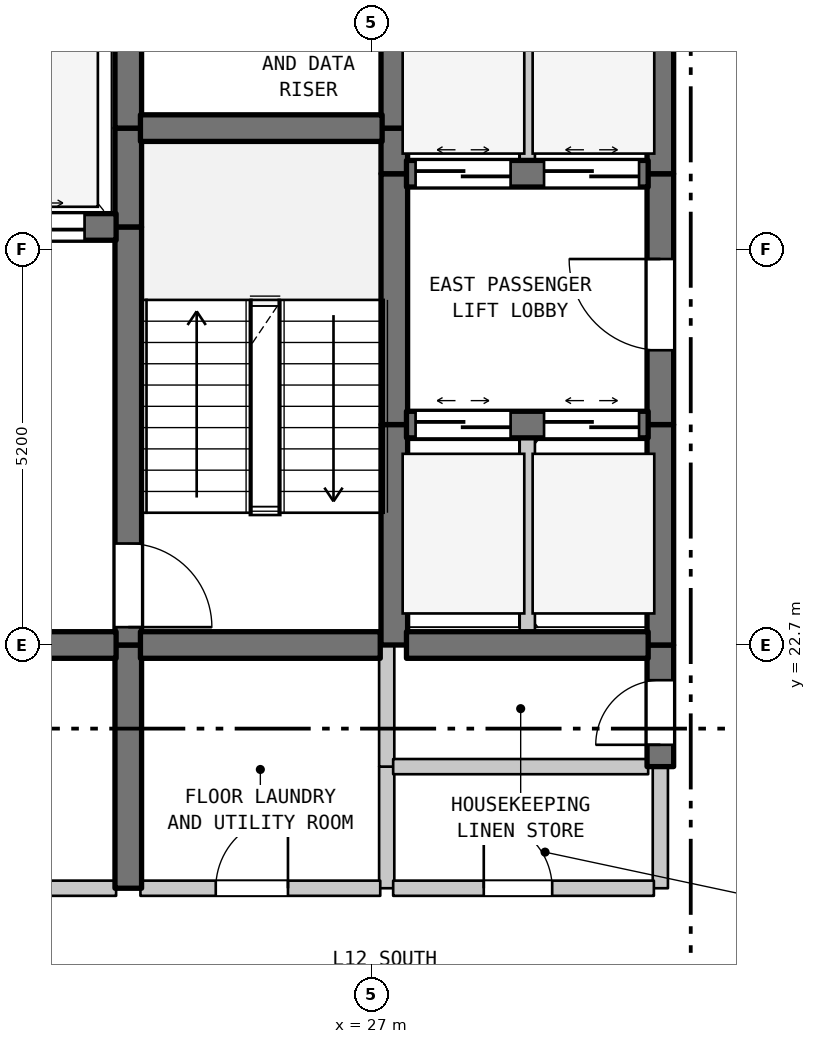
"""IFC4 building model, lengths in metres.
Left out: names, types, materials, properties, quantities, classifications, styles, units other than length and angle.
Written with IfcOpenShell. Run it as: python <this file> out.ifc"""

import sys

from ifc_helpers import new_model, si_unit, direction, frame, frame_2d, origin, place, context, subcontext, project, spatial, rectangle, extrude, element, fill, save


model = new_model("IFC4")
c1 = context("Model", 3, precision=1e-05, world=origin(), true_north=direction((0.0, 1.0)))
c2 = subcontext(c1, "Body", "Model", "MODEL_VIEW")
j1 = project(units=[si_unit("LENGTHUNIT", "METRE"), si_unit("PLANEANGLEUNIT", "RADIAN")], contexts=[c1])
p1 = place(None, origin())
s1 = spatial("IfcSite", under=j1, at=p1, CompositionType="ELEMENT")
p2 = place(p1, origin())
s2 = spatial("IfcBuilding", under=s1, at=p2, CompositionType="ELEMENT")
p3 = place(p2, frame((0.0, 0.0, 53.6)))
s3 = spatial("IfcBuildingStorey", under=s2, at=p3, CompositionType="ELEMENT", Elevation=53.6)
p4 = place(p3, frame((23.8, 19.5, 0.0), z_axis=(0.0, 0.0, 1.0), x_axis=(0.0, 1.0, 0.0)))
e1 = element("IfcWall", 1, at=p4, inside=s3, PredefinedType="SHEAR", context=c2, shape_type="SweptSolid", body=[
    extrude(rectangle(XDim=3.2, YDim=0.35, at=frame_2d((1.6, 0.0))), origin(), (0.0, 0.0, 1.0), 3.385),
])
p5 = place(p3, frame((23.8, 22.7, 0.0), z_axis=(0.0, 0.0, 1.0), x_axis=(0.0, 1.0, 0.0)))
e2 = element("IfcWall", 2, at=p5, inside=s3, PredefinedType="SHEAR", context=c2, shape_type="SweptSolid", body=[
    extrude(rectangle(XDim=5.5, YDim=0.35, at=frame_2d((2.75, 0.0))), origin(), (0.0, 0.0, 1.0), 3.385),
])
p6 = place(p5, frame((0.235, 0.0, 0.0)))
e3 = element("IfcOpeningElement", 3, at=p6, cuts=e2, PredefinedType="OPENING", context=c2, shape_type="SweptSolid", body=[
    extrude(rectangle(XDim=1.1, YDim=2.15, at=frame_2d((0.55, 1.075))), frame((0.0, 0.185, 0.0), z_axis=(0.0, -1.0, 0.0), x_axis=(1.0, 0.0, 0.0)), (0.0, 0.0, 1.0), 0.37),
])
for number, where, z_axis, x_axis in (
    (4, (23.8, 28.2, 0.0), (0.0, 0.0, 1.0), (0.0, 1.0, 0.0)),
    (5, (23.8, 29.5, 0.0), (0.0, 0.0, 1.0), (0.0, 1.0, 0.0)),
):
    element("IfcWall", number, at=place(p3, frame(where, z_axis=z_axis, x_axis=x_axis)), inside=s3, PredefinedType="SHEAR", context=c2, shape_type="SweptSolid", body=[
        extrude(rectangle(XDim=1.3, YDim=0.35, at=frame_2d((0.65, 0.0))), origin(), (0.0, 0.0, 1.0), 3.385),
    ])
p7 = place(p3, frame((27.2, 19.5, 0.0), z_axis=(0.0, 0.0, 1.0), x_axis=(0.0, 1.0, 0.0)))
e6 = element("IfcWall", 6, at=p7, inside=s3, PredefinedType="STANDARD", context=c2, shape_type="SweptSolid", body=[
    extrude(rectangle(XDim=1.6, YDim=0.2, at=frame_2d((0.8, 0.0))), origin(), (0.0, 0.0, 1.0), 3.385),
])
p8 = place(p3, frame((27.2, 21.1, 0.0), z_axis=(0.0, 0.0, 1.0), x_axis=(0.0, 1.0, 0.0)))
e7 = element("IfcWall", 7, at=p8, inside=s3, PredefinedType="STANDARD", context=c2, shape_type="SweptSolid", body=[
    extrude(rectangle(XDim=1.6, YDim=0.2, at=frame_2d((0.8, 0.0))), origin(), (0.0, 0.0, 1.0), 3.385),
])
p9 = place(p3, frame((27.3, 22.7, 0.0), z_axis=(0.0, 0.0, 1.0), x_axis=(0.0, 1.0, 0.0)))
e8 = element("IfcWall", 8, at=p9, inside=s3, PredefinedType="SHEAR", context=c2, shape_type="SweptSolid", body=[
    extrude(rectangle(XDim=2.9, YDim=0.35, at=frame_2d((1.45, 0.0))), origin(), (0.0, 0.0, 1.0), 3.385),
])
p10 = place(p3, frame((27.3, 25.6, 0.0), z_axis=(0.0, 0.0, 1.0), x_axis=(0.0, 1.0, 0.0)))
e9 = element("IfcWall", 9, at=p10, inside=s3, PredefinedType="SHEAR", context=c2, shape_type="SweptSolid", body=[
    extrude(rectangle(XDim=3.3, YDim=0.35, at=frame_2d((1.65, 0.0))), origin(), (0.0, 0.0, 1.0), 3.385),
])
p11 = place(p3, frame((27.3, 28.9, 0.0), z_axis=(0.0, 0.0, 1.0), x_axis=(0.0, 1.0, 0.0)))
e10 = element("IfcWall", 10, at=p11, inside=s3, PredefinedType="SHEAR", context=c2, shape_type="SweptSolid", body=[
    extrude(rectangle(XDim=0.6, YDim=0.35, at=frame_2d((0.3, 0.0))), origin(), (0.0, 0.0, 1.0), 3.385),
])
p12 = place(p3, frame((27.3, 29.5, 0.0), z_axis=(0.0, 0.0, 1.0), x_axis=(0.0, 1.0, 0.0)))
e11 = element("IfcWall", 11, at=p12, inside=s3, PredefinedType="SHEAR", context=c2, shape_type="SweptSolid", body=[
    extrude(rectangle(XDim=2.0, YDim=0.35, at=frame_2d((1.0, 0.0))), origin(), (0.0, 0.0, 1.0), 3.385),
])
p13 = place(p3, frame((29.05, 22.7, 0.0), z_axis=(0.0, 0.0, 1.0), x_axis=(0.0, 1.0, 0.0)))
e12 = element("IfcWall", 12, at=p13, inside=s3, PredefinedType="STANDARD", context=c2, shape_type="SweptSolid", body=[
    extrude(rectangle(XDim=2.9, YDim=0.2, at=frame_2d((1.45, 0.0))), origin(), (0.0, 0.0, 1.0), 3.385),
])
p14 = place(p3, frame((29.05, 28.9, 0.0), z_axis=(0.0, 0.0, 1.0), x_axis=(0.0, 1.0, 0.0)))
e13 = element("IfcWall", 13, at=p14, inside=s3, PredefinedType="STANDARD", context=c2, shape_type="SweptSolid", body=[
    extrude(rectangle(XDim=2.6, YDim=0.2, at=frame_2d((1.3, 0.0))), origin(), (0.0, 0.0, 1.0), 3.385),
])
p15 = place(p3, frame((30.8, 19.5, 0.0), z_axis=(0.0, 0.0, 1.0), x_axis=(0.0, 1.0, 0.0)))
e14 = element("IfcWall", 14, at=p15, inside=s3, PredefinedType="STANDARD", context=c2, shape_type="SweptSolid", body=[
    extrude(rectangle(XDim=1.6, YDim=0.2, at=frame_2d((0.8, 0.0))), origin(), (0.0, 0.0, 1.0), 3.385),
])
p16 = place(p3, frame((30.8, 21.1, 0.0), z_axis=(0.0, 0.0, 1.0), x_axis=(0.0, 1.0, 0.0)))
e15 = element("IfcWall", 15, at=p16, inside=s3, PredefinedType="SHEAR", context=c2, shape_type="SweptSolid", body=[
    extrude(rectangle(XDim=1.6, YDim=0.35, at=frame_2d((0.8, 0.0))), origin(), (0.0, 0.0, 1.0), 3.385),
])
p17 = place(p16, frame((0.287, 0.0, 0.0)))
e16 = element("IfcOpeningElement", 16, at=p17, cuts=e15, PredefinedType="OPENING", context=c2, shape_type="SweptSolid", body=[
    extrude(rectangle(XDim=0.85, YDim=2.1, at=frame_2d((0.425, 1.05))), frame((0.0, 0.185, 0.0), z_axis=(0.0, -1.0, 0.0), x_axis=(1.0, 0.0, 0.0)), (0.0, 0.0, 1.0), 0.37),
])
p18 = place(p3, frame((30.8, 22.7, 0.0), z_axis=(0.0, 0.0, 1.0), x_axis=(0.0, 1.0, 0.0)))
e17 = element("IfcWall", 17, at=p18, inside=s3, PredefinedType="SHEAR", context=c2, shape_type="SweptSolid", body=[
    extrude(rectangle(XDim=2.9, YDim=0.35, at=frame_2d((1.45, 0.0))), origin(), (0.0, 0.0, 1.0), 3.385),
])
p19 = place(p3, frame((30.8, 25.6, 0.0), z_axis=(0.0, 0.0, 1.0), x_axis=(0.0, 1.0, 0.0)))
e18 = element("IfcWall", 18, at=p19, inside=s3, PredefinedType="SHEAR", context=c2, shape_type="SweptSolid", body=[
    extrude(rectangle(XDim=3.3, YDim=0.35, at=frame_2d((1.65, 0.0))), origin(), (0.0, 0.0, 1.0), 3.385),
])
p20 = place(p19, frame((0.978, 0.0, 0.0)))
e19 = element("IfcOpeningElement", 19, at=p20, cuts=e18, PredefinedType="OPENING", context=c2, shape_type="SweptSolid", body=[
    extrude(rectangle(XDim=1.2, YDim=2.2, at=frame_2d((0.6, 1.1))), frame((0.0, 0.185, 0.0), z_axis=(0.0, -1.0, 0.0), x_axis=(1.0, 0.0, 0.0)), (0.0, 0.0, 1.0), 0.37),
])
p21 = place(p3, frame((30.8, 28.9, 0.0), z_axis=(0.0, 0.0, 1.0), x_axis=(0.0, 1.0, 0.0)))
e20 = element("IfcWall", 20, at=p21, inside=s3, PredefinedType="SHEAR", context=c2, shape_type="SweptSolid", body=[
    extrude(rectangle(XDim=2.6, YDim=0.35, at=frame_2d((1.3, 0.0))), origin(), (0.0, 0.0, 1.0), 3.385),
])
p22 = place(p3, frame((19.16, 19.5, 0.0), z_axis=(0.0, 0.0, 1.0), x_axis=(1.0, 0.0, 0.0)))
e21 = element("IfcWall", 21, at=p22, inside=s3, PredefinedType="STANDARD", context=c2, shape_type="SweptSolid", body=[
    extrude(rectangle(XDim=4.48, YDim=0.2, at=frame_2d((2.24, 0.0))), origin(), (0.0, 0.0, 1.0), 3.385),
])
p23 = place(p22, frame((1.64, 0.0, 0.0)))
e22 = element("IfcOpeningElement", 22, at=p23, cuts=e21, PredefinedType="OPENING", context=c2, shape_type="SweptSolid", body=[
    extrude(rectangle(XDim=1.2, YDim=2.2, at=frame_2d((0.6, 1.1))), frame((0.0, 0.11, 0.0), z_axis=(0.0, -1.0, 0.0), x_axis=(1.0, 0.0, 0.0)), (0.0, 0.0, 1.0), 0.22),
])
p24 = place(p3, frame((23.96, 19.5, 0.0), z_axis=(0.0, 0.0, 1.0), x_axis=(1.0, 0.0, 0.0)))
e23 = element("IfcWall", 23, at=p24, inside=s3, PredefinedType="STANDARD", context=c2, shape_type="SweptSolid", body=[
    extrude(rectangle(XDim=3.155, YDim=0.2, at=frame_2d((1.578, 0.0))), origin(), (0.0, 0.0, 1.0), 3.385),
])
p25 = place(p24, frame((0.991, 0.0, 0.0)))
e24 = element("IfcOpeningElement", 24, at=p25, cuts=e23, PredefinedType="OPENING", context=c2, shape_type="SweptSolid", body=[
    extrude(rectangle(XDim=0.95, YDim=2.15, at=frame_2d((0.475, 1.075))), frame((0.0, 0.11, 0.0), z_axis=(0.0, -1.0, 0.0), x_axis=(1.0, 0.0, 0.0)), (0.0, 0.0, 1.0), 0.22),
])
p26 = place(p3, frame((27.285, 19.5, 0.0), z_axis=(0.0, 0.0, 1.0), x_axis=(1.0, 0.0, 0.0)))
e25 = element("IfcWall", 25, at=p26, inside=s3, PredefinedType="STANDARD", context=c2, shape_type="SweptSolid", body=[
    extrude(rectangle(XDim=3.43, YDim=0.2, at=frame_2d((1.715, 0.0))), origin(), (0.0, 0.0, 1.0), 3.385),
])
p27 = place(p26, frame((1.192, 0.0, 0.0)))
e26 = element("IfcOpeningElement", 26, at=p27, cuts=e25, PredefinedType="OPENING", context=c2, shape_type="SweptSolid", body=[
    extrude(rectangle(XDim=0.9, YDim=2.15, at=frame_2d((0.45, 1.075))), frame((0.0, 0.11, 0.0), z_axis=(0.0, -1.0, 0.0), x_axis=(1.0, 0.0, 0.0)), (0.0, 0.0, 1.0), 0.22),
])
p28 = place(p3, frame((27.285, 21.1, 0.0), z_axis=(0.0, 0.0, 1.0), x_axis=(1.0, 0.0, 0.0)))
e27 = element("IfcWall", 27, at=p28, inside=s3, PredefinedType="STANDARD", context=c2, shape_type="SweptSolid", body=[
    extrude(rectangle(XDim=3.355, YDim=0.2, at=frame_2d((1.677, 0.0))), origin(), (0.0, 0.0, 1.0), 3.385),
])
p29 = place(p3, frame((19.16, 22.7, 0.0), z_axis=(0.0, 0.0, 1.0), x_axis=(1.0, 0.0, 0.0)))
e28 = element("IfcWall", 28, at=p29, inside=s3, PredefinedType="SHEAR", context=c2, shape_type="SweptSolid", body=[
    extrude(rectangle(XDim=4.48, YDim=0.35, at=frame_2d((2.24, 0.0))), origin(), (0.0, 0.0, 1.0), 3.385),
])
p30 = place(p29, frame((1.64, 0.0, 0.0)))
e29 = element("IfcOpeningElement", 29, at=p30, cuts=e28, PredefinedType="OPENING", context=c2, shape_type="SweptSolid", body=[
    extrude(rectangle(XDim=1.2, YDim=2.2, at=frame_2d((0.6, 1.1))), frame((0.0, 0.185, 0.0), z_axis=(0.0, -1.0, 0.0), x_axis=(1.0, 0.0, 0.0)), (0.0, 0.0, 1.0), 0.37),
])
p31 = place(p3, frame((23.96, 22.7, 0.0), z_axis=(0.0, 0.0, 1.0), x_axis=(1.0, 0.0, 0.0)))
e30 = element("IfcWall", 30, at=p31, inside=s3, PredefinedType="SHEAR", context=c2, shape_type="SweptSolid", body=[
    extrude(rectangle(XDim=3.155, YDim=0.35, at=frame_2d((1.578, 0.0))), origin(), (0.0, 0.0, 1.0), 3.385),
])
p32 = place(p3, frame((27.46, 22.7, 0.0), z_axis=(0.0, 0.0, 1.0), x_axis=(1.0, 0.0, 0.0)))
e31 = element("IfcWall", 31, at=p32, inside=s3, PredefinedType="SHEAR", context=c2, shape_type="SweptSolid", body=[
    extrude(rectangle(XDim=3.18, YDim=0.35, at=frame_2d((1.59, 0.0))), origin(), (0.0, 0.0, 1.0), 3.385),
])
p33 = place(p3, frame((27.46, 25.6, 0.0), z_axis=(0.0, 0.0, 1.0), x_axis=(1.0, 0.0, 0.0)))
e32 = element("IfcWall", 32, at=p33, inside=s3, PredefinedType="SHEAR", context=c2, shape_type="SweptSolid", body=[
    extrude(rectangle(XDim=3.18, YDim=0.35, at=frame_2d((1.59, 0.0))), origin(), (0.0, 0.0, 1.0), 3.385),
])
p34 = place(p33, frame((0.12, 0.0, 0.0)))
e33 = element("IfcOpeningElement", 33, at=p34, cuts=e32, PredefinedType="OPENING", context=c2, shape_type="SweptSolid", body=[
    extrude(rectangle(XDim=1.25, YDim=2.2, at=frame_2d((0.625, 1.1))), frame((0.0, 0.185, 0.0), z_axis=(0.0, -1.0, 0.0), x_axis=(1.0, 0.0, 0.0)), (0.0, 0.0, 1.0), 0.37),
])
p35 = place(p33, frame((1.81, 0.0, 0.0)))
e34 = element("IfcOpeningElement", 34, at=p35, cuts=e32, PredefinedType="OPENING", context=c2, shape_type="SweptSolid", body=[
    extrude(rectangle(XDim=1.25, YDim=2.2, at=frame_2d((0.625, 1.1))), frame((0.0, 0.185, 0.0), z_axis=(0.0, -1.0, 0.0), x_axis=(1.0, 0.0, 0.0)), (0.0, 0.0, 1.0), 0.37),
])
p36 = place(p3, frame((19.16, 28.2, 0.0), z_axis=(0.0, 0.0, 1.0), x_axis=(1.0, 0.0, 0.0)))
e35 = element("IfcWall", 35, at=p36, inside=s3, PredefinedType="SHEAR", context=c2, shape_type="SweptSolid", body=[
    extrude(rectangle(XDim=4.48, YDim=0.35, at=frame_2d((2.24, 0.0))), origin(), (0.0, 0.0, 1.0), 3.385),
])
p37 = place(p36, frame((0.415, 0.0, 0.0)))
e36 = element("IfcOpeningElement", 36, at=p37, cuts=e35, PredefinedType="OPENING", context=c2, shape_type="SweptSolid", body=[
    extrude(rectangle(XDim=1.25, YDim=2.2, at=frame_2d((0.625, 1.1))), frame((0.0, 0.185, 0.0), z_axis=(0.0, -1.0, 0.0), x_axis=(1.0, 0.0, 0.0)), (0.0, 0.0, 1.0), 0.37),
])
p38 = place(p36, frame((2.815, 0.0, 0.0)))
e37 = element("IfcOpeningElement", 37, at=p38, cuts=e35, PredefinedType="OPENING", context=c2, shape_type="SweptSolid", body=[
    extrude(rectangle(XDim=1.25, YDim=2.2, at=frame_2d((0.625, 1.1))), frame((0.0, 0.185, 0.0), z_axis=(0.0, -1.0, 0.0), x_axis=(1.0, 0.0, 0.0)), (0.0, 0.0, 1.0), 0.37),
])
p39 = place(p3, frame((27.46, 28.9, 0.0), z_axis=(0.0, 0.0, 1.0), x_axis=(1.0, 0.0, 0.0)))
e38 = element("IfcWall", 38, at=p39, inside=s3, PredefinedType="SHEAR", context=c2, shape_type="SweptSolid", body=[
    extrude(rectangle(XDim=3.18, YDim=0.35, at=frame_2d((1.59, 0.0))), origin(), (0.0, 0.0, 1.0), 3.385),
])
p40 = place(p39, frame((0.12, 0.0, 0.0)))
e39 = element("IfcOpeningElement", 39, at=p40, cuts=e38, PredefinedType="OPENING", context=c2, shape_type="SweptSolid", body=[
    extrude(rectangle(XDim=1.25, YDim=2.2, at=frame_2d((0.625, 1.1))), frame((0.0, 0.185, 0.0), z_axis=(0.0, -1.0, 0.0), x_axis=(1.0, 0.0, 0.0)), (0.0, 0.0, 1.0), 0.37),
])
p41 = place(p39, frame((1.81, 0.0, 0.0)))
e40 = element("IfcOpeningElement", 40, at=p41, cuts=e38, PredefinedType="OPENING", context=c2, shape_type="SweptSolid", body=[
    extrude(rectangle(XDim=1.25, YDim=2.2, at=frame_2d((0.625, 1.1))), frame((0.0, 0.185, 0.0), z_axis=(0.0, -1.0, 0.0), x_axis=(1.0, 0.0, 0.0)), (0.0, 0.0, 1.0), 0.37),
])
p42 = place(p3, frame((23.96, 29.5, 0.0), z_axis=(0.0, 0.0, 1.0), x_axis=(1.0, 0.0, 0.0)))
e41 = element("IfcWall", 41, at=p42, inside=s3, PredefinedType="SHEAR", context=c2, shape_type="SweptSolid", body=[
    extrude(rectangle(XDim=3.18, YDim=0.35, at=frame_2d((1.59, 0.0))), origin(), (0.0, 0.0, 1.0), 3.385),
])
p43 = place(p6, frame((1.1, 0.0, 0.0), z_axis=(0.0, 0.0, 1.0), x_axis=(-1.0, 0.0, 0.0)))
e42 = element("IfcDoor", 42, at=p43, inside=s3, OperationType="SINGLE_SWING_LEFT", PredefinedType="DOOR", context=c2, shape_type="SweptSolid", body=[
    extrude(rectangle(XDim=1.1, YDim=2.15, at=frame_2d((0.55, 1.075))), frame((0.0, 0.025, 0.0), z_axis=(0.0, -1.0, 0.0), x_axis=(1.0, 0.0, 0.0)), (0.0, 0.0, 1.0), 0.05),
])
fill(e3, e42)
p44 = place(p17, origin())
e43 = element("IfcDoor", 43, at=p44, inside=s3, OperationType="SINGLE_SWING_LEFT", PredefinedType="DOOR", context=c2, shape_type="SweptSolid", body=[
    extrude(rectangle(XDim=0.85, YDim=2.1, at=frame_2d((0.425, 1.05))), frame((0.0, 0.025, 0.0), z_axis=(0.0, -1.0, 0.0), x_axis=(1.0, 0.0, 0.0)), (0.0, 0.0, 1.0), 0.05),
])
fill(e16, e43)
p45 = place(p20, origin())
e44 = element("IfcDoor", 44, at=p45, inside=s3, OperationType="SINGLE_SWING_RIGHT", PredefinedType="DOOR", context=c2, shape_type="SweptSolid", body=[
    extrude(rectangle(XDim=1.2, YDim=2.2, at=frame_2d((0.6, 1.1))), frame((0.0, 0.025, 0.0), z_axis=(0.0, -1.0, 0.0), x_axis=(1.0, 0.0, 0.0)), (0.0, 0.0, 1.0), 0.05),
])
fill(e19, e44)
p46 = place(p25, origin())
e45 = element("IfcDoor", 45, at=p46, inside=s3, OperationType="SINGLE_SWING_RIGHT", PredefinedType="DOOR", context=c2, shape_type="SweptSolid", body=[
    extrude(rectangle(XDim=0.95, YDim=2.15, at=frame_2d((0.475, 1.075))), frame((0.0, 0.025, 0.0), z_axis=(0.0, -1.0, 0.0), x_axis=(1.0, 0.0, 0.0)), (0.0, 0.0, 1.0), 0.05),
])
fill(e24, e45)
p47 = place(p27, origin())
e46 = element("IfcDoor", 46, at=p47, inside=s3, OperationType="SINGLE_SWING_LEFT", PredefinedType="DOOR", context=c2, shape_type="SweptSolid", body=[
    extrude(rectangle(XDim=0.9, YDim=2.15, at=frame_2d((0.45, 1.075))), frame((0.0, 0.025, 0.0), z_axis=(0.0, -1.0, 0.0), x_axis=(1.0, 0.0, 0.0)), (0.0, 0.0, 1.0), 0.05),
])
fill(e26, e46)
p48 = place(p34, origin())
e47 = element("IfcDoor", 47, at=p48, inside=s3, OperationType="DOUBLE_DOOR_SLIDING", PredefinedType="DOOR", context=c2, shape_type="SweptSolid", body=[
    extrude(rectangle(XDim=1.25, YDim=2.2, at=frame_2d((0.625, 1.1))), frame((0.0, 0.025, 0.0), z_axis=(0.0, -1.0, 0.0), x_axis=(1.0, 0.0, 0.0)), (0.0, 0.0, 1.0), 0.05),
])
fill(e33, e47)
p49 = place(p35, origin())
e48 = element("IfcDoor", 48, at=p49, inside=s3, OperationType="DOUBLE_DOOR_SLIDING", PredefinedType="DOOR", context=c2, shape_type="SweptSolid", body=[
    extrude(rectangle(XDim=1.25, YDim=2.2, at=frame_2d((0.625, 1.1))), frame((0.0, 0.025, 0.0), z_axis=(0.0, -1.0, 0.0), x_axis=(1.0, 0.0, 0.0)), (0.0, 0.0, 1.0), 0.05),
])
fill(e34, e48)
p50 = place(p38, origin())
e49 = element("IfcDoor", 49, at=p50, inside=s3, OperationType="DOUBLE_DOOR_SLIDING", PredefinedType="DOOR", context=c2, shape_type="SweptSolid", body=[
    extrude(rectangle(XDim=1.25, YDim=2.2, at=frame_2d((0.625, 1.1))), frame((0.0, 0.025, 0.0), z_axis=(0.0, -1.0, 0.0), x_axis=(1.0, 0.0, 0.0)), (0.0, 0.0, 1.0), 0.05),
])
fill(e37, e49)
p51 = place(p40, origin())
e50 = element("IfcDoor", 50, at=p51, inside=s3, OperationType="DOUBLE_DOOR_SLIDING", PredefinedType="DOOR", context=c2, shape_type="SweptSolid", body=[
    extrude(rectangle(XDim=1.25, YDim=2.2, at=frame_2d((0.625, 1.1))), frame((0.0, 0.025, 0.0), z_axis=(0.0, -1.0, 0.0), x_axis=(1.0, 0.0, 0.0)), (0.0, 0.0, 1.0), 0.05),
])
fill(e39, e50)
p52 = place(p41, origin())
e51 = element("IfcDoor", 51, at=p52, inside=s3, OperationType="DOUBLE_DOOR_SLIDING", PredefinedType="DOOR", context=c2, shape_type="SweptSolid", body=[
    extrude(rectangle(XDim=1.25, YDim=2.2, at=frame_2d((0.625, 1.1))), frame((0.0, 0.025, 0.0), z_axis=(0.0, -1.0, 0.0), x_axis=(1.0, 0.0, 0.0)), (0.0, 0.0, 1.0), 0.05),
])
fill(e40, e51)
save(model, sys.argv[1])
